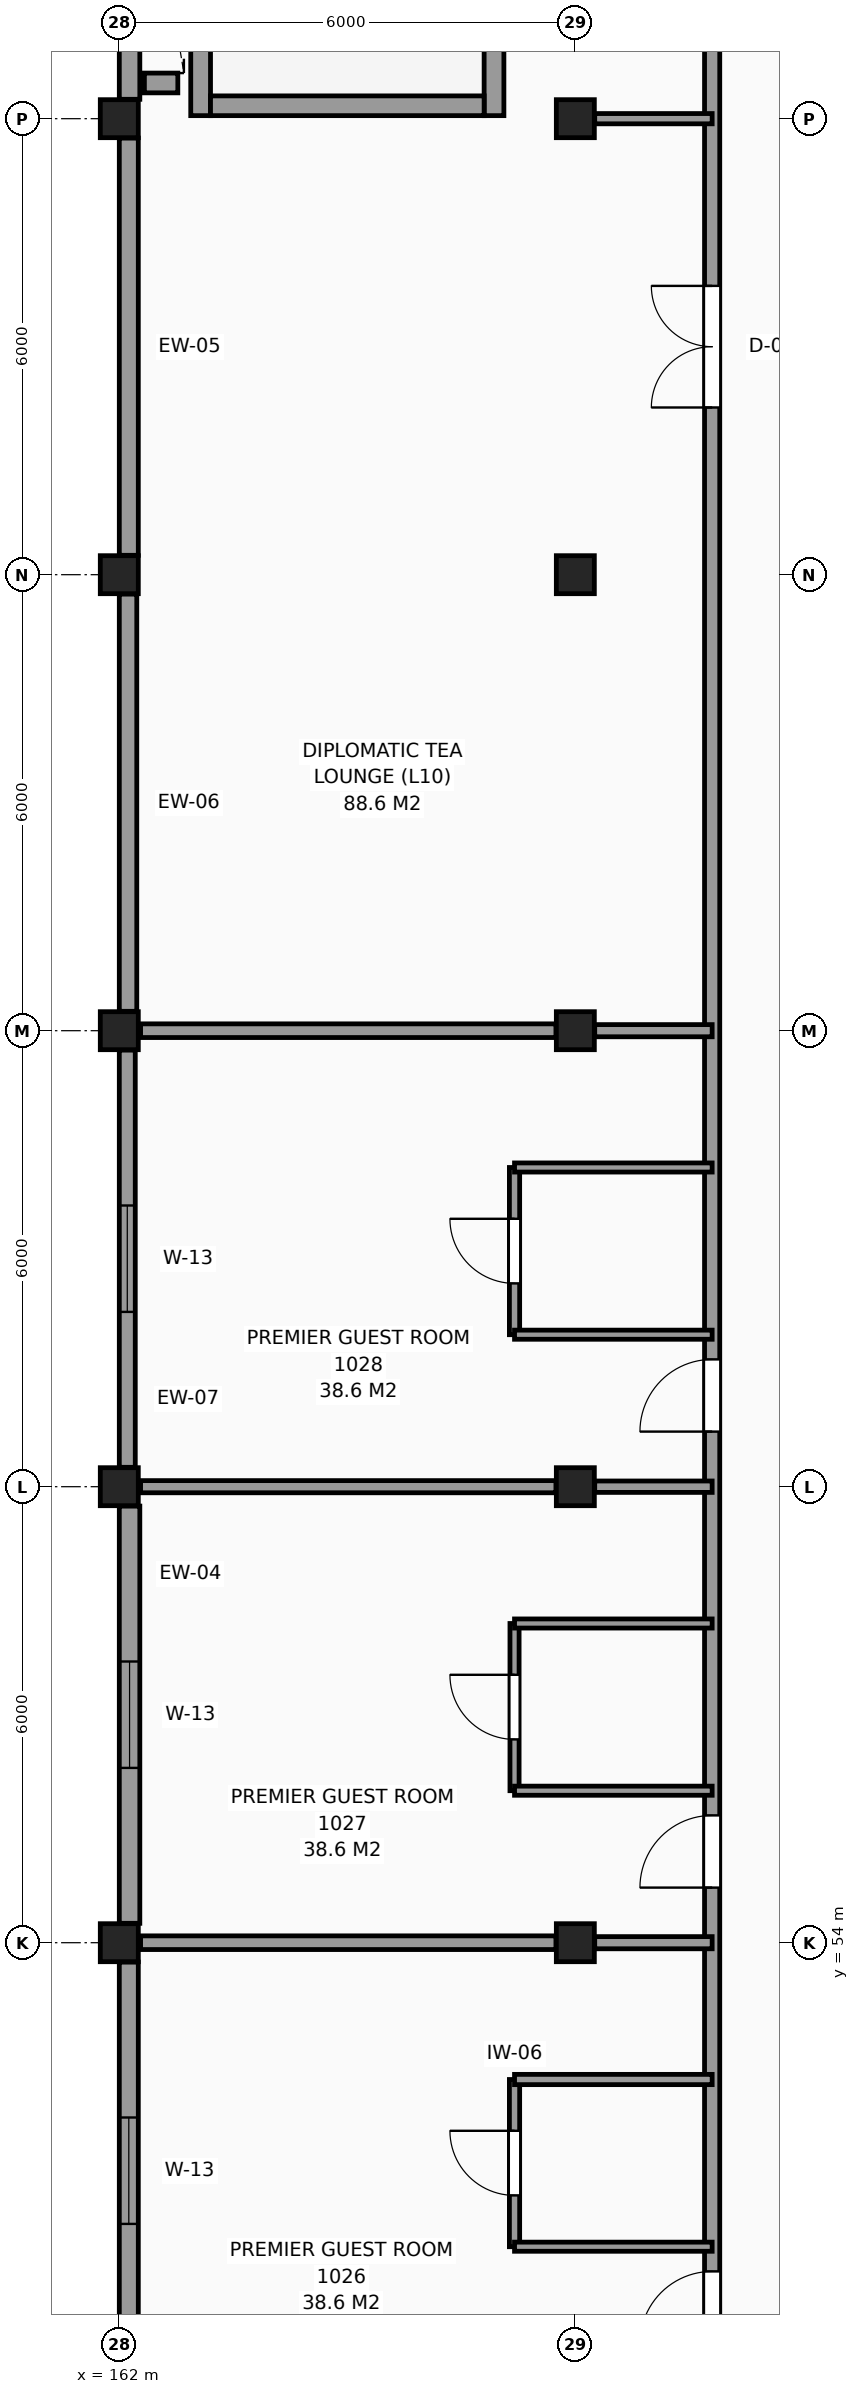
"""IFC4 building model, lengths in metres.
Left out: names, types, materials, properties, quantities, classifications, styles, units other than length and angle.
Written with IfcOpenShell. Run it as: python <this file> out.ifc"""

import sys

from ifc_helpers import new_model, si_unit, direction, frame, frame_2d, origin, origin_2d, place, context, subcontext, project, spatial, rectangle, extrude, element, fill, save


model = new_model("IFC4")
c1 = context("Model", 3, precision=1e-05, world=origin(), true_north=direction((0.0, 1.0)))
c2 = subcontext(c1, "Body", "Model", "MODEL_VIEW")
j1 = project(units=[si_unit("LENGTHUNIT", "METRE"), si_unit("PLANEANGLEUNIT", "RADIAN")], contexts=[c1])
p1 = place(None, origin())
s1 = spatial("IfcSite", under=j1, at=p1, CompositionType="ELEMENT")
p2 = place(p1, origin())
s2 = spatial("IfcBuilding", under=s1, at=p2, CompositionType="ELEMENT")
p3 = place(p2, frame((0.0, 0.0, 41.4)))
s3 = spatial("IfcBuildingStorey", under=s2, at=p3, CompositionType="ELEMENT", Elevation=41.4)
for number, where, z_axis, x_axis in (
    (1, (162.0, 54.0, 0.0), (0.0, 0.0, 1.0), (1.0, 0.0, 0.0)),
    (2, (162.0, 60.0, 0.0), (0.0, 0.0, 1.0), (1.0, 0.0, 0.0)),
    (3, (162.0, 66.0, 0.0), (0.0, 0.0, 1.0), (1.0, 0.0, 0.0)),
    (4, (162.0, 72.0, 0.0), (0.0, 0.0, 1.0), (1.0, 0.0, 0.0)),
    (5, (162.0, 78.0, 0.0), (0.0, 0.0, 1.0), (1.0, 0.0, 0.0)),
    (6, (168.0, 54.0, 0.0), (0.0, 0.0, 1.0), (1.0, 0.0, 0.0)),
    (7, (168.0, 60.0, 0.0), (0.0, 0.0, 1.0), (1.0, 0.0, 0.0)),
    (8, (168.0, 66.0, 0.0), (0.0, 0.0, 1.0), (1.0, 0.0, 0.0)),
    (9, (168.0, 72.0, 0.0), (0.0, 0.0, 1.0), (1.0, 0.0, 0.0)),
    (10, (168.0, 78.0, 0.0), (0.0, 0.0, 1.0), (1.0, 0.0, 0.0)),
):
    element("IfcColumn", number, at=place(p3, frame(where, z_axis=z_axis, x_axis=x_axis)), inside=s3, PredefinedType="COLUMN", context=c2, shape_type="SweptSolid", body=[
        extrude(rectangle(XDim=0.5, YDim=0.5, at=origin_2d()), origin(), (0.0, 0.0, 1.0), 3.3),
    ])
p4 = place(p3, frame((162.135, 83.745, 0.0), z_axis=(0.0, 0.0, 1.0), x_axis=(0.0, -1.0, 0.0)))
e11 = element("IfcWall", 11, at=p4, inside=s3, PredefinedType="SOLIDWALL", context=c2, shape_type="SweptSolid", body=[
    extrude(rectangle(XDim=5.49, YDim=0.27, at=frame_2d((2.745, 0.0))), origin(), (0.0, 0.0, 1.0), 3.06),
])
p5 = place(p3, frame((162.125, 77.745, 0.0), z_axis=(0.0, 0.0, 1.0), x_axis=(0.0, -1.0, 0.0)))
e12 = element("IfcWall", 12, at=p5, inside=s3, PredefinedType="SOLIDWALL", context=c2, shape_type="SweptSolid", body=[
    extrude(rectangle(XDim=5.49, YDim=0.25, at=frame_2d((2.745, 0.0))), origin(), (0.0, 0.0, 1.0), 2.41),
])
p6 = place(p3, frame((162.115, 71.745, 0.0), z_axis=(0.0, 0.0, 1.0), x_axis=(0.0, -1.0, 0.0)))
e13 = element("IfcWall", 13, at=p6, inside=s3, PredefinedType="SOLIDWALL", context=c2, shape_type="SweptSolid", body=[
    extrude(rectangle(XDim=5.49, YDim=0.23, at=frame_2d((2.745, 0.0))), origin(), (0.0, 0.0, 1.0), 2.41),
])
p7 = place(p3, frame((162.105, 65.745, 0.0), z_axis=(0.0, 0.0, 1.0), x_axis=(0.0, -1.0, 0.0)))
e14 = element("IfcWall", 14, at=p7, inside=s3, PredefinedType="SOLIDWALL", context=c2, shape_type="SweptSolid", body=[
    extrude(rectangle(XDim=5.49, YDim=0.21, at=frame_2d((2.745, 0.0))), origin(), (0.0, 0.0, 1.0), 2.445),
])
p8 = place(p7, frame((2.045, 0.0, 0.8)))
e15 = element("IfcOpeningElement", 15, at=p8, cuts=e14, PredefinedType="OPENING", context=c2, shape_type="SweptSolid", body=[
    extrude(rectangle(XDim=1.4, YDim=1.4, at=frame_2d((0.7, 0.7))), frame((0.0, 0.115, 0.0), z_axis=(0.0, -1.0, 0.0), x_axis=(1.0, 0.0, 0.0)), (0.0, 0.0, 1.0), 0.23),
])
p9 = place(p3, frame((162.135, 59.745, 0.0), z_axis=(0.0, 0.0, 1.0), x_axis=(0.0, -1.0, 0.0)))
e16 = element("IfcWall", 16, at=p9, inside=s3, PredefinedType="SOLIDWALL", context=c2, shape_type="SweptSolid", body=[
    extrude(rectangle(XDim=5.49, YDim=0.27, at=frame_2d((2.745, 0.0))), origin(), (0.0, 0.0, 1.0), 2.445),
])
p10 = place(p9, frame((2.045, 0.0, 0.8)))
e17 = element("IfcOpeningElement", 17, at=p10, cuts=e16, PredefinedType="OPENING", context=c2, shape_type="SweptSolid", body=[
    extrude(rectangle(XDim=1.4, YDim=1.4, at=frame_2d((0.7, 0.7))), frame((0.0, 0.145, 0.0), z_axis=(0.0, -1.0, 0.0), x_axis=(1.0, 0.0, 0.0)), (0.0, 0.0, 1.0), 0.29),
])
p11 = place(p3, frame((162.125, 53.745, 0.0), z_axis=(0.0, 0.0, 1.0), x_axis=(0.0, -1.0, 0.0)))
e18 = element("IfcWall", 18, at=p11, inside=s3, PredefinedType="SOLIDWALL", context=c2, shape_type="SweptSolid", body=[
    extrude(rectangle(XDim=5.49, YDim=0.25, at=frame_2d((2.745, 0.0))), origin(), (0.0, 0.0, 1.0), 2.445),
])
p12 = place(p11, frame((2.045, 0.0, 0.8)))
e19 = element("IfcOpeningElement", 19, at=p12, cuts=e18, PredefinedType="OPENING", context=c2, shape_type="SweptSolid", body=[
    extrude(rectangle(XDim=1.4, YDim=1.4, at=frame_2d((0.7, 0.7))), frame((0.0, 0.135, 0.0), z_axis=(0.0, -1.0, 0.0), x_axis=(1.0, 0.0, 0.0)), (0.0, 0.0, 1.0), 0.27),
])
for number, where, z_axis, x_axis in (
    (20, (163.07, 78.04, 0.0), (0.0, 0.0, 1.0), (0.0, 1.0, 0.0)),
    (21, (166.93, 78.04, 0.0), (0.0, 0.0, 1.0), (0.0, 1.0, 0.0)),
):
    element("IfcWall", number, at=place(p3, frame(where, z_axis=z_axis, x_axis=x_axis)), inside=s3, PredefinedType="SHEAR", context=c2, shape_type="SweptSolid", body=[
        extrude(rectangle(XDim=10.72, YDim=0.26, at=frame_2d((5.36, 0.0))), origin(), (0.0, 0.0, 1.0), 3.3),
    ])
p13 = place(p3, frame((163.2, 78.17, 0.0), z_axis=(0.0, 0.0, 1.0), x_axis=(1.0, 0.0, 0.0)))
e22 = element("IfcWall", 22, at=p13, inside=s3, PredefinedType="SHEAR", context=c2, shape_type="SweptSolid", body=[
    extrude(rectangle(XDim=3.6, YDim=0.26, at=frame_2d((1.8, 0.0))), origin(), (0.0, 0.0, 1.0), 3.3),
])
p14 = place(p3, frame((162.33, 78.47, 0.0), z_axis=(0.0, 0.0, 1.0), x_axis=(1.0, 0.0, 0.0)))
e23 = element("IfcWall", 23, at=p14, inside=s3, PredefinedType="SHEAR", context=c2, shape_type="SweptSolid", body=[
    extrude(rectangle(XDim=0.44, YDim=0.26, at=frame_2d((0.22, 0.0))), origin(), (0.0, 0.0, 1.0), 3.3),
])
p15 = place(p3, frame((167.2, 50.0, 0.0), z_axis=(0.0, 0.0, 1.0), x_axis=(0.0, 1.0, 0.0)))
e24 = element("IfcWall", 24, at=p15, inside=s3, PredefinedType="PARTITIONING", context=c2, shape_type="SweptSolid", body=[
    extrude(rectangle(XDim=2.2, YDim=0.135, at=frame_2d((1.1, 0.0))), origin(), (0.0, 0.0, 1.0), 3.06),
])
p16 = place(p15, frame((0.675, 0.0, 0.0)))
e25 = element("IfcOpeningElement", 25, at=p16, cuts=e24, PredefinedType="OPENING", context=c2, shape_type="SweptSolid", body=[
    extrude(rectangle(XDim=0.85, YDim=2.1, at=frame_2d((0.425, 1.05))), frame((0.0, 0.078, 0.0), z_axis=(0.0, -1.0, 0.0), x_axis=(1.0, 0.0, 0.0)), (0.0, 0.0, 1.0), 0.155),
])
p17 = place(p3, frame((167.2, 56.0, 0.0), z_axis=(0.0, 0.0, 1.0), x_axis=(0.0, 1.0, 0.0)))
e26 = element("IfcWall", 26, at=p17, inside=s3, PredefinedType="PARTITIONING", context=c2, shape_type="SweptSolid", body=[
    extrude(rectangle(XDim=2.2, YDim=0.12, at=frame_2d((1.1, 0.0))), origin(), (0.0, 0.0, 1.0), 3.06),
])
p18 = place(p17, frame((0.675, 0.0, 0.0)))
e27 = element("IfcOpeningElement", 27, at=p18, cuts=e26, PredefinedType="OPENING", context=c2, shape_type="SweptSolid", body=[
    extrude(rectangle(XDim=0.85, YDim=2.1, at=frame_2d((0.425, 1.05))), frame((0.0, 0.07, 0.0), z_axis=(0.0, -1.0, 0.0), x_axis=(1.0, 0.0, 0.0)), (0.0, 0.0, 1.0), 0.14),
])
p19 = place(p3, frame((167.2, 62.0, 0.0), z_axis=(0.0, 0.0, 1.0), x_axis=(0.0, 1.0, 0.0)))
e28 = element("IfcWall", 28, at=p19, inside=s3, PredefinedType="PARTITIONING", context=c2, shape_type="SweptSolid", body=[
    extrude(rectangle(XDim=2.2, YDim=0.135, at=frame_2d((1.1, 0.0))), origin(), (0.0, 0.0, 1.0), 3.06),
])
p20 = place(p19, frame((0.675, 0.0, 0.0)))
e29 = element("IfcOpeningElement", 29, at=p20, cuts=e28, PredefinedType="OPENING", context=c2, shape_type="SweptSolid", body=[
    extrude(rectangle(XDim=0.85, YDim=2.1, at=frame_2d((0.425, 1.05))), frame((0.0, 0.078, 0.0), z_axis=(0.0, -1.0, 0.0), x_axis=(1.0, 0.0, 0.0)), (0.0, 0.0, 1.0), 0.155),
])
p21 = place(p3, frame((169.8, 42.275, 0.0), z_axis=(0.0, 0.0, 1.0), x_axis=(0.0, 1.0, 0.0)))
e30 = element("IfcWall", 30, at=p21, inside=s3, PredefinedType="PARTITIONING", context=c2, shape_type="SweptSolid", body=[
    extrude(rectangle(XDim=65.545, YDim=0.2, at=frame_2d((32.772, 0.0))), origin(), (0.0, 0.0, 1.0), 3.06),
])
p22 = place(p21, frame((50.125, 0.0, 0.0)))
e31 = element("IfcOpeningElement", 31, at=p22, cuts=e30, PredefinedType="OPENING", context=c2, shape_type="SweptSolid", body=[
    extrude(rectangle(XDim=1.2, YDim=2.2, at=frame_2d((0.6, 1.1))), frame((0.0, 0.11, 0.0), z_axis=(0.0, -1.0, 0.0), x_axis=(1.0, 0.0, 0.0)), (0.0, 0.0, 1.0), 0.22),
])
p23 = place(p21, frame((31.925, 0.0, 0.0)))
e32 = element("IfcOpeningElement", 32, at=p23, cuts=e30, PredefinedType="OPENING", context=c2, shape_type="SweptSolid", body=[
    extrude(rectangle(XDim=1.6, YDim=2.25, at=frame_2d((0.8, 1.125))), frame((0.0, 0.11, 0.0), z_axis=(0.0, -1.0, 0.0), x_axis=(1.0, 0.0, 0.0)), (0.0, 0.0, 1.0), 0.22),
])
p24 = place(p21, frame((0.4, 0.0, 0.0)))
e33 = element("IfcOpeningElement", 33, at=p24, cuts=e30, PredefinedType="OPENING", context=c2, shape_type="SweptSolid", body=[
    extrude(rectangle(XDim=0.95, YDim=2.1, at=frame_2d((0.475, 1.05))), frame((0.0, 0.11, 0.0), z_axis=(0.0, -1.0, 0.0), x_axis=(1.0, 0.0, 0.0)), (0.0, 0.0, 1.0), 0.22),
])
p25 = place(p21, frame((6.45, 0.0, 0.0)))
e34 = element("IfcOpeningElement", 34, at=p25, cuts=e30, PredefinedType="OPENING", context=c2, shape_type="SweptSolid", body=[
    extrude(rectangle(XDim=0.95, YDim=2.1, at=frame_2d((0.475, 1.05))), frame((0.0, 0.11, 0.0), z_axis=(0.0, -1.0, 0.0), x_axis=(1.0, 0.0, 0.0)), (0.0, 0.0, 1.0), 0.22),
])
p26 = place(p21, frame((12.45, 0.0, 0.0)))
e35 = element("IfcOpeningElement", 35, at=p26, cuts=e30, PredefinedType="OPENING", context=c2, shape_type="SweptSolid", body=[
    extrude(rectangle(XDim=0.95, YDim=2.1, at=frame_2d((0.475, 1.05))), frame((0.0, 0.11, 0.0), z_axis=(0.0, -1.0, 0.0), x_axis=(1.0, 0.0, 0.0)), (0.0, 0.0, 1.0), 0.22),
])
p27 = place(p21, frame((18.45, 0.0, 0.0)))
e36 = element("IfcOpeningElement", 36, at=p27, cuts=e30, PredefinedType="OPENING", context=c2, shape_type="SweptSolid", body=[
    extrude(rectangle(XDim=0.95, YDim=2.1, at=frame_2d((0.475, 1.05))), frame((0.0, 0.11, 0.0), z_axis=(0.0, -1.0, 0.0), x_axis=(1.0, 0.0, 0.0)), (0.0, 0.0, 1.0), 0.22),
])
p28 = place(p21, frame((54.45, 0.0, 0.0)))
e37 = element("IfcOpeningElement", 37, at=p28, cuts=e30, PredefinedType="OPENING", context=c2, shape_type="SweptSolid", body=[
    extrude(rectangle(XDim=0.95, YDim=2.1, at=frame_2d((0.475, 1.05))), frame((0.0, 0.11, 0.0), z_axis=(0.0, -1.0, 0.0), x_axis=(1.0, 0.0, 0.0)), (0.0, 0.0, 1.0), 0.22),
])
p29 = place(p21, frame((60.45, 0.0, 0.0)))
e38 = element("IfcOpeningElement", 38, at=p29, cuts=e30, PredefinedType="OPENING", context=c2, shape_type="SweptSolid", body=[
    extrude(rectangle(XDim=0.95, YDim=2.1, at=frame_2d((0.475, 1.05))), frame((0.0, 0.11, 0.0), z_axis=(0.0, -1.0, 0.0), x_axis=(1.0, 0.0, 0.0)), (0.0, 0.0, 1.0), 0.22),
])
p30 = place(p3, frame((167.2, 50.0, 0.0), z_axis=(0.0, 0.0, 1.0), x_axis=(1.0, 0.0, 0.0)))
e39 = element("IfcWall", 39, at=p30, inside=s3, PredefinedType="PARTITIONING", context=c2, shape_type="SweptSolid", body=[
    extrude(rectangle(XDim=2.6, YDim=0.12, at=frame_2d((1.3, 0.0))), origin(), (0.0, 0.0, 1.0), 3.06),
])
p31 = place(p3, frame((167.2, 52.2, 0.0), z_axis=(0.0, 0.0, 1.0), x_axis=(1.0, 0.0, 0.0)))
e40 = element("IfcWall", 40, at=p31, inside=s3, PredefinedType="PARTITIONING", context=c2, shape_type="SweptSolid", body=[
    extrude(rectangle(XDim=2.6, YDim=0.135, at=frame_2d((1.3, 0.0))), origin(), (0.0, 0.0, 1.0), 3.06),
])
p32 = place(p3, frame((162.28, 54.0, 0.0), z_axis=(0.0, 0.0, 1.0), x_axis=(1.0, 0.0, 0.0)))
e41 = element("IfcWall", 41, at=p32, inside=s3, PredefinedType="PARTITIONING", context=c2, shape_type="SweptSolid", body=[
    extrude(rectangle(XDim=5.465, YDim=0.18, at=frame_2d((2.732, 0.0))), origin(), (0.0, 0.0, 1.0), 2.295),
])
p33 = place(p3, frame((168.255, 54.0, 0.0), z_axis=(0.0, 0.0, 1.0), x_axis=(1.0, 0.0, 0.0)))
e42 = element("IfcWall", 42, at=p33, inside=s3, PredefinedType="PARTITIONING", context=c2, shape_type="SweptSolid", body=[
    extrude(rectangle(XDim=1.545, YDim=0.16, at=frame_2d((0.772, 0.0))), origin(), (0.0, 0.0, 1.0), 2.295),
])
for number, where, z_axis, x_axis in (
    (43, (167.2, 56.0, 0.0), (0.0, 0.0, 1.0), (1.0, 0.0, 0.0)),
    (44, (167.2, 58.2, 0.0), (0.0, 0.0, 1.0), (1.0, 0.0, 0.0)),
):
    element("IfcWall", number, at=place(p3, frame(where, z_axis=z_axis, x_axis=x_axis)), inside=s3, PredefinedType="PARTITIONING", context=c2, shape_type="SweptSolid", body=[
        extrude(rectangle(XDim=2.6, YDim=0.12, at=frame_2d((1.3, 0.0))), origin(), (0.0, 0.0, 1.0), 3.06),
    ])
p34 = place(p3, frame((162.28, 60.0, 0.0), z_axis=(0.0, 0.0, 1.0), x_axis=(1.0, 0.0, 0.0)))
e45 = element("IfcWall", 45, at=p34, inside=s3, PredefinedType="PARTITIONING", context=c2, shape_type="SweptSolid", body=[
    extrude(rectangle(XDim=5.465, YDim=0.16, at=frame_2d((2.732, 0.0))), origin(), (0.0, 0.0, 1.0), 2.295),
])
p35 = place(p3, frame((168.255, 60.0, 0.0), z_axis=(0.0, 0.0, 1.0), x_axis=(1.0, 0.0, 0.0)))
e46 = element("IfcWall", 46, at=p35, inside=s3, PredefinedType="PARTITIONING", context=c2, shape_type="SweptSolid", body=[
    extrude(rectangle(XDim=1.545, YDim=0.15, at=frame_2d((0.772, 0.0))), origin(), (0.0, 0.0, 1.0), 2.295),
])
for number, where, z_axis, x_axis in (
    (47, (167.2, 62.0, 0.0), (0.0, 0.0, 1.0), (1.0, 0.0, 0.0)),
    (48, (167.2, 64.2, 0.0), (0.0, 0.0, 1.0), (1.0, 0.0, 0.0)),
):
    element("IfcWall", number, at=place(p3, frame(where, z_axis=z_axis, x_axis=x_axis)), inside=s3, PredefinedType="PARTITIONING", context=c2, shape_type="SweptSolid", body=[
        extrude(rectangle(XDim=2.6, YDim=0.12, at=frame_2d((1.3, 0.0))), origin(), (0.0, 0.0, 1.0), 3.06),
    ])
p36 = place(p3, frame((162.28, 66.0, 0.0), z_axis=(0.0, 0.0, 1.0), x_axis=(1.0, 0.0, 0.0)))
e49 = element("IfcWall", 49, at=p36, inside=s3, PredefinedType="PARTITIONING", context=c2, shape_type="SweptSolid", body=[
    extrude(rectangle(XDim=5.465, YDim=0.18, at=frame_2d((2.732, 0.0))), origin(), (0.0, 0.0, 1.0), 2.26),
])
p37 = place(p3, frame((168.255, 66.0, 0.0), z_axis=(0.0, 0.0, 1.0), x_axis=(1.0, 0.0, 0.0)))
e50 = element("IfcWall", 50, at=p37, inside=s3, PredefinedType="PARTITIONING", context=c2, shape_type="SweptSolid", body=[
    extrude(rectangle(XDim=1.545, YDim=0.16, at=frame_2d((0.772, 0.0))), origin(), (0.0, 0.0, 1.0), 2.26),
])
p38 = place(p3, frame((168.255, 78.0, 0.0), z_axis=(0.0, 0.0, 1.0), x_axis=(1.0, 0.0, 0.0)))
e51 = element("IfcWall", 51, at=p38, inside=s3, PredefinedType="PARTITIONING", context=c2, shape_type="SweptSolid", body=[
    extrude(rectangle(XDim=1.545, YDim=0.135, at=frame_2d((0.772, 0.0))), origin(), (0.0, 0.0, 1.0), 2.26),
])
p39 = place(p12, origin())
e52 = element("IfcWindow", 52, at=p39, inside=s3, PartitioningType="SINGLE_PANEL", PredefinedType="WINDOW", context=c2, shape_type="SweptSolid", body=[
    extrude(rectangle(XDim=1.4, YDim=1.4, at=frame_2d((0.7, 0.7))), frame((0.0, 0.03, 0.0), z_axis=(0.0, -1.0, 0.0), x_axis=(1.0, 0.0, 0.0)), (0.0, 0.0, 1.0), 0.06),
])
fill(e19, e52)
p40 = place(p10, origin())
e53 = element("IfcWindow", 53, at=p40, inside=s3, PartitioningType="SINGLE_PANEL", PredefinedType="WINDOW", context=c2, shape_type="SweptSolid", body=[
    extrude(rectangle(XDim=1.4, YDim=1.4, at=frame_2d((0.7, 0.7))), frame((0.0, 0.03, 0.0), z_axis=(0.0, -1.0, 0.0), x_axis=(1.0, 0.0, 0.0)), (0.0, 0.0, 1.0), 0.06),
])
fill(e17, e53)
p41 = place(p8, origin())
e54 = element("IfcWindow", 54, at=p41, inside=s3, PartitioningType="SINGLE_PANEL", PredefinedType="WINDOW", context=c2, shape_type="SweptSolid", body=[
    extrude(rectangle(XDim=1.4, YDim=1.4, at=frame_2d((0.7, 0.7))), frame((0.0, 0.03, 0.0), z_axis=(0.0, -1.0, 0.0), x_axis=(1.0, 0.0, 0.0)), (0.0, 0.0, 1.0), 0.06),
])
fill(e15, e54)
p42 = place(p23, origin())
e55 = element("IfcDoor", 55, at=p42, inside=s3, OperationType="DOUBLE_DOOR_SINGLE_SWING", PredefinedType="DOOR", context=c2, shape_type="SweptSolid", body=[
    extrude(rectangle(XDim=1.6, YDim=2.25, at=frame_2d((0.8, 1.125))), frame((0.0, 0.025, 0.0), z_axis=(0.0, -1.0, 0.0), x_axis=(1.0, 0.0, 0.0)), (0.0, 0.0, 1.0), 0.05),
])
fill(e32, e55)
p43 = place(p16, origin())
e56 = element("IfcDoor", 56, at=p43, inside=s3, OperationType="SINGLE_SWING_RIGHT", PredefinedType="DOOR", context=c2, shape_type="SweptSolid", body=[
    extrude(rectangle(XDim=0.85, YDim=2.1, at=frame_2d((0.425, 1.05))), frame((0.0, 0.025, 0.0), z_axis=(0.0, -1.0, 0.0), x_axis=(1.0, 0.0, 0.0)), (0.0, 0.0, 1.0), 0.05),
])
fill(e25, e56)
p44 = place(p25, origin())
e57 = element("IfcDoor", 57, at=p44, inside=s3, OperationType="SINGLE_SWING_LEFT", PredefinedType="DOOR", context=c2, shape_type="SweptSolid", body=[
    extrude(rectangle(XDim=0.95, YDim=2.1, at=frame_2d((0.475, 1.05))), frame((0.0, 0.025, 0.0), z_axis=(0.0, -1.0, 0.0), x_axis=(1.0, 0.0, 0.0)), (0.0, 0.0, 1.0), 0.05),
])
fill(e34, e57)
p45 = place(p18, origin())
e58 = element("IfcDoor", 58, at=p45, inside=s3, OperationType="SINGLE_SWING_RIGHT", PredefinedType="DOOR", context=c2, shape_type="SweptSolid", body=[
    extrude(rectangle(XDim=0.85, YDim=2.1, at=frame_2d((0.425, 1.05))), frame((0.0, 0.025, 0.0), z_axis=(0.0, -1.0, 0.0), x_axis=(1.0, 0.0, 0.0)), (0.0, 0.0, 1.0), 0.05),
])
fill(e27, e58)
p46 = place(p26, origin())
e59 = element("IfcDoor", 59, at=p46, inside=s3, OperationType="SINGLE_SWING_LEFT", PredefinedType="DOOR", context=c2, shape_type="SweptSolid", body=[
    extrude(rectangle(XDim=0.95, YDim=2.1, at=frame_2d((0.475, 1.05))), frame((0.0, 0.025, 0.0), z_axis=(0.0, -1.0, 0.0), x_axis=(1.0, 0.0, 0.0)), (0.0, 0.0, 1.0), 0.05),
])
fill(e35, e59)
p47 = place(p20, origin())
e60 = element("IfcDoor", 60, at=p47, inside=s3, OperationType="SINGLE_SWING_RIGHT", PredefinedType="DOOR", context=c2, shape_type="SweptSolid", body=[
    extrude(rectangle(XDim=0.85, YDim=2.1, at=frame_2d((0.425, 1.05))), frame((0.0, 0.025, 0.0), z_axis=(0.0, -1.0, 0.0), x_axis=(1.0, 0.0, 0.0)), (0.0, 0.0, 1.0), 0.05),
])
fill(e29, e60)
p48 = place(p27, origin())
e61 = element("IfcDoor", 61, at=p48, inside=s3, OperationType="SINGLE_SWING_LEFT", PredefinedType="DOOR", context=c2, shape_type="SweptSolid", body=[
    extrude(rectangle(XDim=0.95, YDim=2.1, at=frame_2d((0.475, 1.05))), frame((0.0, 0.025, 0.0), z_axis=(0.0, -1.0, 0.0), x_axis=(1.0, 0.0, 0.0)), (0.0, 0.0, 1.0), 0.05),
])
fill(e36, e61)
save(model, sys.argv[1])
